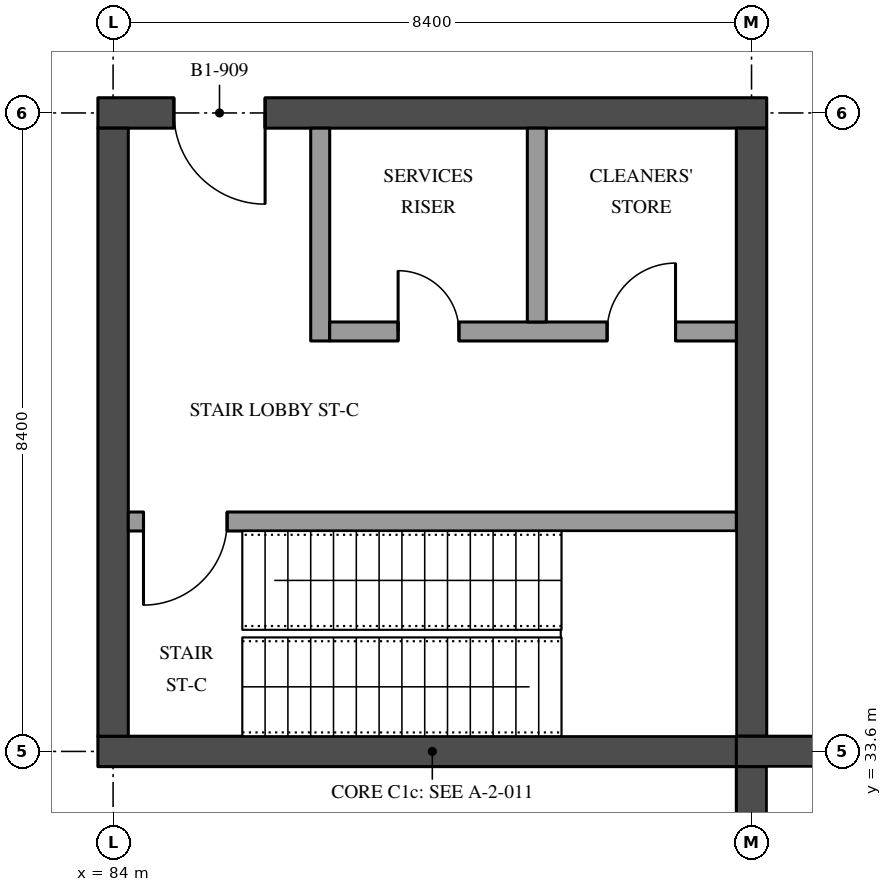
"""IFC4 building model, lengths in metres.
Left out: names, types, materials, properties, quantities, classifications, styles, units other than length and angle.
Written with IfcOpenShell. Run it as: python <this file> out.ifc"""

import sys

from ifc_helpers import new_model, si_unit, direction, frame, frame_2d, origin, place, context, subcontext, project, spatial, rectangle, extrude, element, fill, save


model = new_model("IFC4")
c1 = context("Model", 3, precision=1e-05, world=origin(), true_north=direction((0.0, 1.0)))
c2 = subcontext(c1, "Body", "Model", "MODEL_VIEW")
j1 = project(units=[si_unit("LENGTHUNIT", "METRE"), si_unit("PLANEANGLEUNIT", "RADIAN")], contexts=[c1])
p1 = place(None, origin())
s1 = spatial("IfcSite", under=j1, at=p1, CompositionType="ELEMENT")
p2 = place(p1, origin())
s2 = spatial("IfcBuilding", under=s1, at=p2, CompositionType="ELEMENT")
p3 = place(p2, frame((0.0, 0.0, -4.5)))
s3 = spatial("IfcBuildingStorey", under=s2, at=p3, CompositionType="ELEMENT", Elevation=-4.5)
p4 = place(p3, frame((83.8, 33.6, 0.0), z_axis=(0.0, 0.0, 1.0), x_axis=(1.0, 0.0, 0.0)))
e1 = element("IfcWall", 1, at=p4, inside=s3, PredefinedType="SHEAR", context=c2, shape_type="SweptSolid", body=[
    extrude(rectangle(XDim=8.8, YDim=0.4, at=frame_2d((4.4, 0.0))), origin(), (0.0, 0.0, 1.0), 4.05),
])
p5 = place(p3, frame((83.8, 42.0, 0.0), z_axis=(0.0, 0.0, 1.0), x_axis=(1.0, 0.0, 0.0)))
e2 = element("IfcWall", 2, at=p5, inside=s3, PredefinedType="SHEAR", context=c2, shape_type="SweptSolid", body=[
    extrude(rectangle(XDim=8.8, YDim=0.4, at=frame_2d((4.4, 0.0))), origin(), (0.0, 0.0, 1.0), 4.05),
])
p6 = place(p5, frame((1.0, 0.0, 0.0)))
e3 = element("IfcOpeningElement", 3, at=p6, cuts=e2, PredefinedType="OPENING", context=c2, shape_type="SweptSolid", body=[
    extrude(rectangle(XDim=1.2, YDim=2.1, at=frame_2d((0.6, 1.05))), frame((0.0, 0.21, 0.0), z_axis=(0.0, -1.0, 0.0), x_axis=(1.0, 0.0, 0.0)), (0.0, 0.0, 1.0), 0.42),
])
for number, where, z_axis, x_axis in (
    (4, (84.0, 33.8, 0.0), (0.0, 0.0, 1.0), (0.0, 1.0, 0.0)),
    (5, (92.4, 33.8, 0.0), (0.0, 0.0, 1.0), (0.0, 1.0, 0.0)),
):
    element("IfcWall", number, at=place(p3, frame(where, z_axis=z_axis, x_axis=x_axis)), inside=s3, PredefinedType="SHEAR", context=c2, shape_type="SweptSolid", body=[
        extrude(rectangle(XDim=8.0, YDim=0.4, at=frame_2d((4.0, 0.0))), origin(), (0.0, 0.0, 1.0), 4.05),
    ])
p7 = place(p3, frame((84.2, 36.625, 0.0), z_axis=(0.0, 0.0, 1.0), x_axis=(1.0, 0.0, 0.0)))
e6 = element("IfcWall", 6, at=p7, inside=s3, PredefinedType="SOLIDWALL", context=c2, shape_type="SweptSolid", body=[
    extrude(rectangle(XDim=8.0, YDim=0.25, at=frame_2d((4.0, 0.0))), origin(), (0.0, 0.0, 1.0), 4.05),
])
p8 = place(p7, frame((0.2, 0.0, 0.0)))
e7 = element("IfcOpeningElement", 7, at=p8, cuts=e6, PredefinedType="OPENING", context=c2, shape_type="SweptSolid", body=[
    extrude(rectangle(XDim=1.1, YDim=2.1, at=frame_2d((0.55, 1.05))), frame((0.0, 0.135, 0.0), z_axis=(0.0, -1.0, 0.0), x_axis=(1.0, 0.0, 0.0)), (0.0, 0.0, 1.0), 0.27),
])
p9 = place(p3, frame((86.725, 39.0, 0.0), z_axis=(0.0, 0.0, 1.0), x_axis=(0.0, 1.0, 0.0)))
e8 = element("IfcWall", 8, at=p9, inside=s3, PredefinedType="SOLIDWALL", context=c2, shape_type="SweptSolid", body=[
    extrude(rectangle(XDim=2.8, YDim=0.25, at=frame_2d((1.4, 0.0))), origin(), (0.0, 0.0, 1.0), 4.05),
])
p10 = place(p3, frame((86.85, 39.125, 0.0), z_axis=(0.0, 0.0, 1.0), x_axis=(1.0, 0.0, 0.0)))
e9 = element("IfcWall", 9, at=p10, inside=s3, PredefinedType="SOLIDWALL", context=c2, shape_type="SweptSolid", body=[
    extrude(rectangle(XDim=5.35, YDim=0.25, at=frame_2d((2.675, 0.0))), origin(), (0.0, 0.0, 1.0), 4.05),
])
p11 = place(p10, frame((3.65, 0.0, 0.0)))
e10 = element("IfcOpeningElement", 10, at=p11, cuts=e9, PredefinedType="OPENING", context=c2, shape_type="SweptSolid", body=[
    extrude(rectangle(XDim=0.9, YDim=2.1, at=frame_2d((0.45, 1.05))), frame((0.0, 0.135, 0.0), z_axis=(0.0, -1.0, 0.0), x_axis=(1.0, 0.0, 0.0)), (0.0, 0.0, 1.0), 0.27),
])
p12 = place(p10, frame((0.9, 0.0, 0.0)))
e11 = element("IfcOpeningElement", 11, at=p12, cuts=e9, PredefinedType="OPENING", context=c2, shape_type="SweptSolid", body=[
    extrude(rectangle(XDim=0.8, YDim=2.1, at=frame_2d((0.4, 1.05))), frame((0.0, 0.135, 0.0), z_axis=(0.0, -1.0, 0.0), x_axis=(1.0, 0.0, 0.0)), (0.0, 0.0, 1.0), 0.27),
])
p13 = place(p3, frame((89.575, 39.25, 0.0), z_axis=(0.0, 0.0, 1.0), x_axis=(0.0, 1.0, 0.0)))
e12 = element("IfcWall", 12, at=p13, inside=s3, PredefinedType="SOLIDWALL", context=c2, shape_type="SweptSolid", body=[
    extrude(rectangle(XDim=2.55, YDim=0.25, at=frame_2d((1.275, 0.0))), origin(), (0.0, 0.0, 1.0), 4.05),
])
p14 = place(p3, frame((92.2, 33.6, 0.0), z_axis=(0.0, 0.0, 1.0), x_axis=(1.0, 0.0, 0.0)))
e13 = element("IfcWall", 13, at=p14, inside=s3, PredefinedType="SHEAR", context=c2, shape_type="SweptSolid", body=[
    extrude(rectangle(XDim=8.8, YDim=0.4, at=frame_2d((4.4, 0.0))), origin(), (0.0, 0.0, 1.0), 4.05),
])
p15 = place(p3, frame((92.4, 25.4, 0.0), z_axis=(0.0, 0.0, 1.0), x_axis=(0.0, 1.0, 0.0)))
e14 = element("IfcWall", 14, at=p15, inside=s3, PredefinedType="SHEAR", context=c2, shape_type="SweptSolid", body=[
    extrude(rectangle(XDim=8.0, YDim=0.4, at=frame_2d((4.0, 0.0))), origin(), (0.0, 0.0, 1.0), 4.05),
])
p16 = place(p11, origin())
e15 = element("IfcDoor", 15, at=p16, inside=s3, OperationType="SINGLE_SWING_LEFT", PredefinedType="DOOR", context=c2, shape_type="SweptSolid", body=[
    extrude(rectangle(XDim=0.9, YDim=2.1, at=frame_2d((0.45, 1.05))), frame((0.0, 0.035, 0.0), z_axis=(0.0, -1.0, 0.0), x_axis=(1.0, 0.0, 0.0)), (0.0, 0.0, 1.0), 0.07),
])
fill(e10, e15)
p17 = place(p6, frame((1.2, 0.0, 0.0), z_axis=(0.0, 0.0, 1.0), x_axis=(-1.0, 0.0, 0.0)))
e16 = element("IfcDoor", 16, at=p17, inside=s3, OperationType="SINGLE_SWING_RIGHT", PredefinedType="DOOR", context=c2, shape_type="SweptSolid", body=[
    extrude(rectangle(XDim=1.2, YDim=2.1, at=frame_2d((0.6, 1.05))), frame((0.0, 0.035, 0.0), z_axis=(0.0, -1.0, 0.0), x_axis=(1.0, 0.0, 0.0)), (0.0, 0.0, 1.0), 0.07),
])
fill(e3, e16)
p18 = place(p12, origin())
e17 = element("IfcDoor", 17, at=p18, inside=s3, OperationType="SINGLE_SWING_RIGHT", PredefinedType="DOOR", context=c2, shape_type="SweptSolid", body=[
    extrude(rectangle(XDim=0.8, YDim=2.1, at=frame_2d((0.4, 1.05))), frame((0.0, 0.035, 0.0), z_axis=(0.0, -1.0, 0.0), x_axis=(1.0, 0.0, 0.0)), (0.0, 0.0, 1.0), 0.07),
])
fill(e11, e17)
p19 = place(p8, frame((1.1, 0.0, 0.0), z_axis=(0.0, 0.0, 1.0), x_axis=(-1.0, 0.0, 0.0)))
e18 = element("IfcDoor", 18, at=p19, inside=s3, OperationType="SINGLE_SWING_LEFT", PredefinedType="DOOR", context=c2, shape_type="SweptSolid", body=[
    extrude(rectangle(XDim=1.1, YDim=2.1, at=frame_2d((0.55, 1.05))), frame((0.0, 0.035, 0.0), z_axis=(0.0, -1.0, 0.0), x_axis=(1.0, 0.0, 0.0)), (0.0, 0.0, 1.0), 0.07),
])
fill(e7, e18)
save(model, sys.argv[1])
